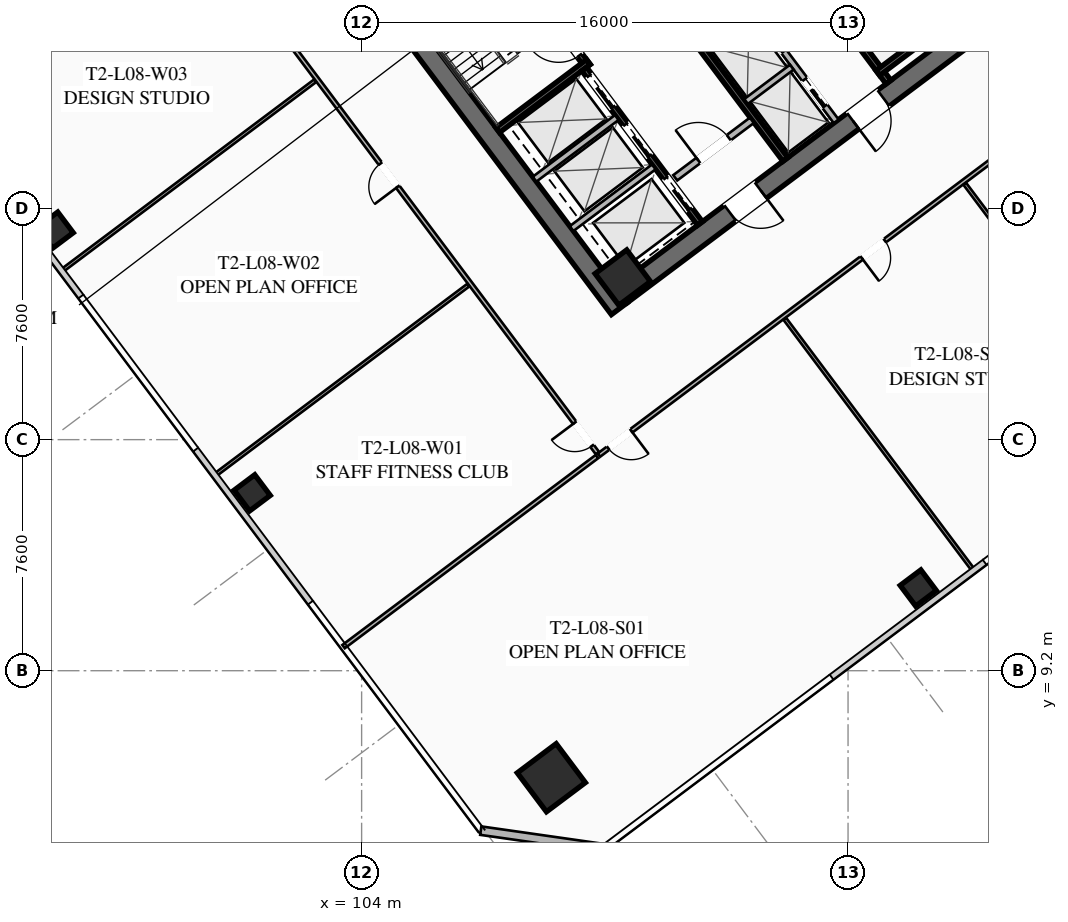
"""IFC4 building model, lengths in metres.
Left out: names, types, materials, properties, quantities, classifications, styles, units other than length and angle.
Written with IfcOpenShell. Run it as: python <this file> out.ifc"""

import sys

from ifc_helpers import new_model, si_unit, direction, frame, frame_2d, origin, origin_2d, place, context, subcontext, project, spatial, rectangle, hollow_rectangle, extrude, element, fill, save


model = new_model("IFC4")
c1 = context("Model", 3, precision=1e-05, world=origin(), true_north=direction((0.0, 1.0)))
c2 = subcontext(c1, "Body", "Model", "MODEL_VIEW")
j1 = project(units=[si_unit("LENGTHUNIT", "METRE"), si_unit("PLANEANGLEUNIT", "RADIAN")], contexts=[c1])
p1 = place(None, origin())
s1 = spatial("IfcSite", under=j1, at=p1, CompositionType="ELEMENT")
p2 = place(p1, origin())
s2 = spatial("IfcBuilding", under=s1, at=p2, CompositionType="ELEMENT")
p3 = place(p2, frame((0.0, 0.0, 35.25)))
s3 = spatial("IfcBuildingStorey", under=s2, at=p3, CompositionType="ELEMENT", Elevation=35.25)
p4 = place(p3, frame((112.476, 21.107, 0.0), z_axis=(0.0, 0.0, 1.0), x_axis=(-0.600005007985, 0.799996243986, 0.0)))
e1 = element("IfcWall", 1, at=p4, inside=s3, PredefinedType="SHEAR", context=c2, shape_type="SweptSolid", body=[
    extrude(rectangle(XDim=15.6, YDim=0.65, at=frame_2d((7.8, 0.0))), origin(), (0.0, 0.0, 1.0), 3.55),
])
p5 = place(p3, frame((124.429, 30.478, 0.0), z_axis=(0.0, 0.0, 1.0), x_axis=(-0.799998028465, -0.600002628705, 0.0)))
e2 = element("IfcWall", 2, at=p5, inside=s3, PredefinedType="SHEAR", context=c2, shape_type="SweptSolid", body=[
    extrude(rectangle(XDim=14.86, YDim=0.65, at=frame_2d((7.43, 0.0))), origin(), (0.0, 0.0, 1.0), 3.55),
])
p6 = place(p5, frame((9.13, 0.0, 0.0)))
e3 = element("IfcOpeningElement", 3, at=p6, cuts=e2, PredefinedType="OPENING", context=c2, shape_type="SweptSolid", body=[
    extrude(rectangle(XDim=1.25, YDim=2.25, at=frame_2d((0.625, 1.125))), frame((0.0, 0.335, 0.0), z_axis=(0.0, -1.0, 0.0), x_axis=(1.0, 0.0, 0.0)), (0.0, 0.0, 1.0), 0.67),
])
p7 = place(p5, frame((4.08, 0.0, 0.0)))
e4 = element("IfcOpeningElement", 4, at=p7, cuts=e2, PredefinedType="OPENING", context=c2, shape_type="SweptSolid", body=[
    extrude(rectangle(XDim=1.25, YDim=2.25, at=frame_2d((0.625, 1.125))), frame((0.0, 0.335, 0.0), z_axis=(0.0, -1.0, 0.0), x_axis=(1.0, 0.0, 0.0)), (0.0, 0.0, 1.0), 0.67),
])
p8 = place(p3, frame((112.59, 22.13, 0.0), z_axis=(0.0, 0.0, 1.0), x_axis=(0.799999996291, 0.600000004945, 0.0)))
e5 = element("IfcColumn", 5, at=p8, inside=s3, PredefinedType="COLUMN", context=c2, shape_type="SweptSolid", body=[
    extrude(hollow_rectangle(XDim=1.3, YDim=1.3, WallThickness=0.05, at=origin_2d()), origin(), (0.0, 0.0, 1.0), 3.35),
])
p9 = place(p3, frame((110.24, 5.68, 0.0), z_axis=(0.0, 0.0, 1.0), x_axis=(0.799999996291, 0.600000004945, 0.0)))
e6 = element("IfcColumn", 6, at=p9, inside=s3, PredefinedType="COLUMN", context=c2, shape_type="SweptSolid", body=[
    extrude(hollow_rectangle(XDim=1.6, YDim=1.6, WallThickness=0.06, at=origin_2d()), origin(), (0.0, 0.0, 1.0), 3.35),
])
for number, where, z_axis, x_axis in (
    (7, (122.31, 11.92, 0.0), (0.0, 0.0, 1.0), (0.8, 0.6, 0.0)),
    (8, (93.92, 23.69, 0.0), (0.0, 0.0, 1.0), (0.8, 0.6, 0.0)),
    (9, (100.4, 15.05, 0.0), (0.0, 0.0, 1.0), (0.8, 0.6, 0.0)),
):
    element("IfcColumn", number, at=place(p3, frame(where, z_axis=z_axis, x_axis=x_axis)), inside=s3, PredefinedType="COLUMN", context=c2, shape_type="SweptSolid", body=[
        extrude(hollow_rectangle(XDim=0.85, YDim=0.85, WallThickness=0.035, at=origin_2d()), origin(), (0.0, 0.0, 1.0), 3.35),
    ])
p10 = place(p3, frame((111.98, 3.36, 0.0), z_axis=(0.0, 0.0, 1.0), x_axis=(-0.989955445613, 0.14137968631, 0.0)))
e10 = element("IfcWall", 10, at=p10, inside=s3, PredefinedType="SOLIDWALL", context=c2, shape_type="SweptSolid", body=[
    extrude(rectangle(XDim=4.101, YDim=0.28, at=frame_2d((2.051, 0.0))), origin(), (0.0, 0.0, 1.0), 3.35),
])
p11 = place(p3, frame((111.44, 29.08, 0.0), z_axis=(0.0, 0.0, 1.0), x_axis=(-0.600009827119, 0.799992629566, 0.0)))
e11 = element("IfcWall", 11, at=p11, inside=s3, PredefinedType="SHEAR", context=c2, shape_type="SweptSolid", body=[
    extrude(rectangle(XDim=7.95, YDim=0.2, at=frame_2d((3.975, 0.0))), origin(), (0.0, 0.0, 1.0), 3.35),
])
p12 = place(p11, frame((0.45, 0.0, 0.0)))
e12 = element("IfcOpeningElement", 12, at=p12, cuts=e11, PredefinedType="OPENING", context=c2, shape_type="SweptSolid", body=[
    extrude(rectangle(XDim=1.15, YDim=2.2, at=frame_2d((0.575, 1.1))), frame((0.0, 0.11, 0.0), z_axis=(0.0, -1.0, 0.0), x_axis=(1.0, 0.0, 0.0)), (0.0, 0.0, 1.0), 0.22),
])
p13 = place(p3, frame((108.476, 26.982, 0.0), z_axis=(0.0, 0.0, 1.0), x_axis=(0.799984290658, 0.600020945218, 0.0)))
e13 = element("IfcWall", 13, at=p13, inside=s3, PredefinedType="SHEAR", context=c2, shape_type="SweptSolid", body=[
    extrude(rectangle(XDim=3.73, YDim=0.2, at=frame_2d((1.865, 0.0))), origin(), (0.0, 0.0, 1.0), 3.35),
])
p14 = place(p3, frame((116.56, 34.92, 0.0), z_axis=(0.0, 0.0, 1.0), x_axis=(0.600009827119, -0.799992629566, 0.0)))
e14 = element("IfcWall", 14, at=p14, inside=s3, PredefinedType="SHEAR", context=c2, shape_type="SweptSolid", body=[
    extrude(rectangle(XDim=7.95, YDim=0.2, at=frame_2d((3.975, 0.0))), origin(), (0.0, 0.0, 1.0), 3.35),
])
p15 = place(p14, frame((0.45, 0.0, 0.0)))
e15 = element("IfcOpeningElement", 15, at=p15, cuts=e14, PredefinedType="OPENING", context=c2, shape_type="SweptSolid", body=[
    extrude(rectangle(XDim=1.15, YDim=2.2, at=frame_2d((0.575, 1.1))), frame((0.0, 0.11, 0.0), z_axis=(0.0, -1.0, 0.0), x_axis=(1.0, 0.0, 0.0)), (0.0, 0.0, 1.0), 0.22),
])
p16 = place(p3, frame((120.98, 28.86, 0.0), z_axis=(0.0, 0.0, 1.0), x_axis=(0.800039270442, 0.59994763584, 0.0)))
e16 = element("IfcWall", 16, at=p16, inside=s3, PredefinedType="SHEAR", context=c2, shape_type="SweptSolid", body=[
    extrude(rectangle(XDim=3.73, YDim=0.2, at=frame_2d((1.865, 0.0))), origin(), (0.0, 0.0, 1.0), 3.35),
])
p17 = place(p3, frame((117.938, 26.016, 0.0), z_axis=(0.0, 0.0, 1.0), x_axis=(-0.600005463273, 0.799995902516, 0.0)))
e17 = element("IfcWall", 17, at=p17, inside=s3, PredefinedType="SHEAR", context=c2, shape_type="SweptSolid", body=[
    extrude(rectangle(XDim=14.3, YDim=0.2, at=frame_2d((7.15, 0.0))), origin(), (0.0, 0.0, 1.0), 3.35),
])
p18 = place(p3, frame((114.316, 25.412, 0.0), z_axis=(0.0, 0.0, 1.0), x_axis=(0.800018601094, 0.59997519774, 0.0)))
e18 = element("IfcWall", 18, at=p18, inside=s3, PredefinedType="SOLIDWALL", context=c2, shape_type="SweptSolid", body=[
    extrude(rectangle(XDim=3.15, YDim=0.22, at=frame_2d((1.575, 0.0))), origin(), (0.0, 0.0, 1.0), 2.703),
])
p19 = place(p18, frame((0.95, 0.0, 0.0)))
e19 = element("IfcOpeningElement", 19, at=p19, cuts=e18, PredefinedType="OPENING", context=c2, shape_type="SweptSolid", body=[
    extrude(rectangle(XDim=1.25, YDim=2.25, at=frame_2d((0.625, 1.125))), frame((0.0, 0.12, 0.0), z_axis=(0.0, -1.0, 0.0), x_axis=(1.0, 0.0, 0.0)), (0.0, 0.0, 1.0), 0.24),
])
p20 = place(p3, frame((115.13, 23.91, 0.0), z_axis=(0.0, 0.0, 1.0), x_axis=(-0.599975393228, 0.800018454488, 0.0)))
e20 = element("IfcWall", 20, at=p20, inside=s3, PredefinedType="SHEAR", context=c2, shape_type="SweptSolid", body=[
    extrude(rectangle(XDim=6.35, YDim=0.2, at=frame_2d((3.175, 0.0))), origin(), (0.0, 0.0, 1.0), 3.35),
])
p21 = place(p20, frame((4.775, 0.0, 0.0)))
e21 = element("IfcOpeningElement", 21, at=p21, cuts=e20, PredefinedType="OPENING", context=c2, shape_type="SweptSolid", body=[
    extrude(rectangle(XDim=1.3, YDim=2.25, at=frame_2d((0.65, 1.125))), frame((0.0, 0.11, 0.0), z_axis=(0.0, -1.0, 0.0), x_axis=(1.0, 0.0, 0.0)), (0.0, 0.0, 1.0), 0.22),
])
p22 = place(p20, frame((2.775, 0.0, 0.0)))
e22 = element("IfcOpeningElement", 22, at=p22, cuts=e20, PredefinedType="OPENING", context=c2, shape_type="SweptSolid", body=[
    extrude(rectangle(XDim=1.3, YDim=2.25, at=frame_2d((0.65, 1.125))), frame((0.0, 0.11, 0.0), z_axis=(0.0, -1.0, 0.0), x_axis=(1.0, 0.0, 0.0)), (0.0, 0.0, 1.0), 0.22),
])
p23 = place(p20, frame((0.575, 0.0, 0.0)))
e23 = element("IfcOpeningElement", 23, at=p23, cuts=e20, PredefinedType="OPENING", context=c2, shape_type="SweptSolid", body=[
    extrude(rectangle(XDim=1.3, YDim=2.25, at=frame_2d((0.65, 1.125))), frame((0.0, 0.11, 0.0), z_axis=(0.0, -1.0, 0.0), x_axis=(1.0, 0.0, 0.0)), (0.0, 0.0, 1.0), 0.22),
])
for number, where, z_axis, x_axis in (
    (24, (110.906, 23.742, 0.0), (0.0, 0.0, 1.0), (0.8, 0.6, 0.0)),
    (25, (109.688, 25.366, 0.0), (0.0, 0.0, 1.0), (0.8, 0.6, 0.0)),
):
    element("IfcWall", number, at=place(p3, frame(where, z_axis=z_axis, x_axis=x_axis)), inside=s3, PredefinedType="SOLIDWALL", context=c2, shape_type="SweptSolid", body=[
        extrude(rectangle(XDim=3.38, YDim=0.2, at=frame_2d((1.69, 0.0))), origin(), (0.0, 0.0, 1.0), 3.35),
    ])
p24 = place(p3, frame((119.61, 27.27, 0.0), z_axis=(0.0, 0.0, 1.0), x_axis=(-0.600011488909, 0.79999138319, 0.0)))
e26 = element("IfcWall", 26, at=p24, inside=s3, PredefinedType="SOLIDWALL", context=c2, shape_type="SweptSolid", body=[
    extrude(rectangle(XDim=6.8, YDim=0.2, at=frame_2d((3.4, 0.0))), origin(), (0.0, 0.0, 1.0), 3.35),
])
p25 = place(p24, frame((0.625, 0.0, 0.0)))
e27 = element("IfcOpeningElement", 27, at=p25, cuts=e26, PredefinedType="OPENING", context=c2, shape_type="SweptSolid", body=[
    extrude(rectangle(XDim=1.1, YDim=2.2, at=frame_2d((0.55, 1.1))), frame((0.0, 0.11, 0.0), z_axis=(0.0, -1.0, 0.0), x_axis=(1.0, 0.0, 0.0)), (0.0, 0.0, 1.0), 0.22),
])
p26 = place(p24, frame((2.875, 0.0, 0.0)))
e28 = element("IfcOpeningElement", 28, at=p26, cuts=e26, PredefinedType="OPENING", context=c2, shape_type="SweptSolid", body=[
    extrude(rectangle(XDim=1.1, YDim=2.2, at=frame_2d((0.55, 1.1))), frame((0.0, 0.11, 0.0), z_axis=(0.0, -1.0, 0.0), x_axis=(1.0, 0.0, 0.0)), (0.0, 0.0, 1.0), 0.22),
])
p27 = place(p24, frame((5.125, 0.0, 0.0)))
e29 = element("IfcOpeningElement", 29, at=p27, cuts=e26, PredefinedType="OPENING", context=c2, shape_type="SweptSolid", body=[
    extrude(rectangle(XDim=1.1, YDim=2.2, at=frame_2d((0.55, 1.1))), frame((0.0, 0.11, 0.0), z_axis=(0.0, -1.0, 0.0), x_axis=(1.0, 0.0, 0.0)), (0.0, 0.0, 1.0), 0.22),
])
p28 = place(p3, frame((116.646, 27.922, 0.0), z_axis=(0.0, 0.0, 1.0), x_axis=(0.8, 0.6, 0.0)))
e30 = element("IfcWall", 30, at=p28, inside=s3, PredefinedType="SOLIDWALL", context=c2, shape_type="SweptSolid", body=[
    extrude(rectangle(XDim=1.88, YDim=0.2, at=frame_2d((0.94, 0.0))), origin(), (0.0, 0.0, 1.0), 3.35),
])
p29 = place(p3, frame((135.67, 34.19, 0.0), z_axis=(0.0, 0.0, 1.0), x_axis=(-0.800000982127, -0.599998690494, 0.0)))
e31 = element("IfcWall", 31, at=p29, inside=s3, PredefinedType="PARTITIONING", context=c2, shape_type="SweptSolid", body=[
    extrude(rectangle(XDim=29.83, YDim=0.135, at=frame_2d((14.915, 0.0))), origin(), (0.0, 0.0, 1.0), 2.703),
])
p30 = place(p29, frame((28.5, 0.0, 0.0)))
e32 = element("IfcOpeningElement", 32, at=p30, cuts=e31, PredefinedType="OPENING", context=c2, shape_type="SweptSolid", body=[
    extrude(rectangle(XDim=0.95, YDim=2.05, at=frame_2d((0.475, 1.025))), frame((0.0, 0.077, 0.0), z_axis=(0.0, -1.0, 0.0), x_axis=(1.0, 0.0, 0.0)), (0.0, 0.0, 1.0), 0.155),
])
p31 = place(p29, frame((18.075, 0.0, 0.0)))
e33 = element("IfcOpeningElement", 33, at=p31, cuts=e31, PredefinedType="OPENING", context=c2, shape_type="SweptSolid", body=[
    extrude(rectangle(XDim=0.95, YDim=2.05, at=frame_2d((0.475, 1.025))), frame((0.0, 0.077, 0.0), z_axis=(0.0, -1.0, 0.0), x_axis=(1.0, 0.0, 0.0)), (0.0, 0.0, 1.0), 0.155),
])
p32 = place(p29, frame((0.38, 0.0, 0.0)))
e34 = element("IfcOpeningElement", 34, at=p32, cuts=e31, PredefinedType="OPENING", context=c2, shape_type="SweptSolid", body=[
    extrude(rectangle(XDim=0.95, YDim=2.05, at=frame_2d((0.475, 1.025))), frame((0.0, 0.077, 0.0), z_axis=(0.0, -1.0, 0.0), x_axis=(1.0, 0.0, 0.0)), (0.0, 0.0, 1.0), 0.155),
])
p33 = place(p3, frame((124.128, 12.496, 0.0), z_axis=(0.0, 0.0, 1.0), x_axis=(-0.600007548425, 0.799994338626, 0.0)))
e35 = element("IfcWall", 35, at=p33, inside=s3, PredefinedType="PARTITIONING", context=c2, shape_type="SweptSolid", body=[
    extrude(rectangle(XDim=10.35, YDim=0.11, at=frame_2d((5.175, 0.0))), origin(), (0.0, 0.0, 1.0), 2.703),
])
p34 = place(p3, frame((130.048, 16.936, 0.0), z_axis=(0.0, 0.0, 1.0), x_axis=(-0.600011322243, 0.799991508192, 0.0)))
e36 = element("IfcWall", 36, at=p34, inside=s3, PredefinedType="PARTITIONING", context=c2, shape_type="SweptSolid", body=[
    extrude(rectangle(XDim=10.35, YDim=0.11, at=frame_2d((5.175, 0.0))), origin(), (0.0, 0.0, 1.0), 2.703),
])
p35 = place(p3, frame((111.758, 16.356, 0.0), z_axis=(0.0, 0.0, 1.0), x_axis=(-0.600001776367, 0.799998667722, 0.0)))
e37 = element("IfcWall", 37, at=p35, inside=s3, PredefinedType="PARTITIONING", context=c2, shape_type="SweptSolid", body=[
    extrude(rectangle(XDim=21.99, YDim=0.135, at=frame_2d((10.995, 0.0))), origin(), (0.0, 0.0, 1.0), 2.703),
])
p36 = place(p35, frame((0.3, 0.0, 0.0)))
e38 = element("IfcOpeningElement", 38, at=p36, cuts=e37, PredefinedType="OPENING", context=c2, shape_type="SweptSolid", body=[
    extrude(rectangle(XDim=0.95, YDim=2.05, at=frame_2d((0.475, 1.025))), frame((0.0, 0.077, 0.0), z_axis=(0.0, -1.0, 0.0), x_axis=(1.0, 0.0, 0.0)), (0.0, 0.0, 1.0), 0.155),
])
p37 = place(p35, frame((10.952, 0.0, 0.0)))
e39 = element("IfcOpeningElement", 39, at=p37, cuts=e37, PredefinedType="OPENING", context=c2, shape_type="SweptSolid", body=[
    extrude(rectangle(XDim=0.95, YDim=2.05, at=frame_2d((0.475, 1.025))), frame((0.0, 0.077, 0.0), z_axis=(0.0, -1.0, 0.0), x_axis=(1.0, 0.0, 0.0)), (0.0, 0.0, 1.0), 0.155),
])
p38 = place(p35, frame((20.74, 0.0, 0.0)))
e40 = element("IfcOpeningElement", 40, at=p38, cuts=e37, PredefinedType="OPENING", context=c2, shape_type="SweptSolid", body=[
    extrude(rectangle(XDim=0.95, YDim=2.05, at=frame_2d((0.475, 1.025))), frame((0.0, 0.077, 0.0), z_axis=(0.0, -1.0, 0.0), x_axis=(1.0, 0.0, 0.0)), (0.0, 0.0, 1.0), 0.155),
])
p39 = place(p3, frame((98.452, 33.964, 0.0), z_axis=(0.0, 0.0, 1.0), x_axis=(-0.799988753532, -0.600014994998, 0.0)))
e41 = element("IfcWall", 41, at=p39, inside=s3, PredefinedType="PARTITIONING", context=c2, shape_type="SweptSolid", body=[
    extrude(rectangle(XDim=10.42, YDim=0.135, at=frame_2d((5.21, 0.0))), origin(), (0.0, 0.0, 1.0), 2.703),
])
p40 = place(p3, frame((103.406, 9.992, 0.0), z_axis=(0.0, 0.0, 1.0), x_axis=(0.8, 0.6, 0.0)))
e42 = element("IfcWall", 42, at=p40, inside=s3, PredefinedType="PARTITIONING", context=c2, shape_type="SweptSolid", body=[
    extrude(rectangle(XDim=10.42, YDim=0.135, at=frame_2d((5.21, 0.0))), origin(), (0.0, 0.0, 1.0), 2.703),
])
for number, where, z_axis, x_axis in (
    (43, (99.176, 15.632, 0.0), (0.0, 0.0, 1.0), (0.8, 0.6, 0.0)),
    (44, (94.136, 22.352, 0.0), (0.0, 0.0, 1.0), (0.8, 0.6, 0.0)),
):
    element("IfcWall", number, at=place(p3, frame(where, z_axis=z_axis, x_axis=x_axis)), inside=s3, PredefinedType="PARTITIONING", context=c2, shape_type="SweptSolid", body=[
        extrude(rectangle(XDim=10.42, YDim=0.11, at=frame_2d((5.21, 0.0))), origin(), (0.0, 0.0, 1.0), 2.703),
    ])
p41 = place(p6, origin())
e45 = element("IfcDoor", 45, at=p41, inside=s3, OperationType="SINGLE_SWING_LEFT", PredefinedType="DOOR", context=c2, shape_type="SweptSolid", body=[
    extrude(rectangle(XDim=1.25, YDim=2.25, at=frame_2d((0.625, 1.125))), frame((0.0, 0.025, 0.0), z_axis=(0.0, -1.0, 0.0), x_axis=(1.0, 0.0, 0.0)), (0.0, 0.0, 1.0), 0.05),
])
fill(e3, e45)
p42 = place(p7, origin())
e46 = element("IfcDoor", 46, at=p42, inside=s3, OperationType="SINGLE_SWING_RIGHT", PredefinedType="DOOR", context=c2, shape_type="SweptSolid", body=[
    extrude(rectangle(XDim=1.25, YDim=2.25, at=frame_2d((0.625, 1.125))), frame((0.0, 0.025, 0.0), z_axis=(0.0, -1.0, 0.0), x_axis=(1.0, 0.0, 0.0)), (0.0, 0.0, 1.0), 0.05),
])
fill(e4, e46)
p43 = place(p12, origin())
e47 = element("IfcDoor", 47, at=p43, inside=s3, OperationType="SINGLE_SWING_RIGHT", PredefinedType="DOOR", context=c2, shape_type="SweptSolid", body=[
    extrude(rectangle(XDim=1.15, YDim=2.2, at=frame_2d((0.575, 1.1))), frame((0.0, 0.025, 0.0), z_axis=(0.0, -1.0, 0.0), x_axis=(1.0, 0.0, 0.0)), (0.0, 0.0, 1.0), 0.05),
])
fill(e12, e47)
p44 = place(p19, origin())
e48 = element("IfcDoor", 48, at=p44, inside=s3, OperationType="SINGLE_SWING_LEFT", PredefinedType="DOOR", context=c2, shape_type="SweptSolid", body=[
    extrude(rectangle(XDim=1.25, YDim=2.25, at=frame_2d((0.625, 1.125))), frame((0.0, 0.025, 0.0), z_axis=(0.0, -1.0, 0.0), x_axis=(1.0, 0.0, 0.0)), (0.0, 0.0, 1.0), 0.05),
])
fill(e19, e48)
p45 = place(p30, origin())
e49 = element("IfcDoor", 49, at=p45, inside=s3, OperationType="SINGLE_SWING_LEFT", PredefinedType="DOOR", context=c2, shape_type="SweptSolid", body=[
    extrude(rectangle(XDim=0.95, YDim=2.05, at=frame_2d((0.475, 1.025))), frame((0.0, 0.025, 0.0), z_axis=(0.0, -1.0, 0.0), x_axis=(1.0, 0.0, 0.0)), (0.0, 0.0, 1.0), 0.05),
])
fill(e32, e49)
p46 = place(p31, origin())
e50 = element("IfcDoor", 50, at=p46, inside=s3, OperationType="SINGLE_SWING_RIGHT", PredefinedType="DOOR", context=c2, shape_type="SweptSolid", body=[
    extrude(rectangle(XDim=0.95, YDim=2.05, at=frame_2d((0.475, 1.025))), frame((0.0, 0.025, 0.0), z_axis=(0.0, -1.0, 0.0), x_axis=(1.0, 0.0, 0.0)), (0.0, 0.0, 1.0), 0.05),
])
fill(e33, e50)
p47 = place(p36, origin())
e51 = element("IfcDoor", 51, at=p47, inside=s3, OperationType="SINGLE_SWING_RIGHT", PredefinedType="DOOR", context=c2, shape_type="SweptSolid", body=[
    extrude(rectangle(XDim=0.95, YDim=2.05, at=frame_2d((0.475, 1.025))), frame((0.0, 0.025, 0.0), z_axis=(0.0, -1.0, 0.0), x_axis=(1.0, 0.0, 0.0)), (0.0, 0.0, 1.0), 0.05),
])
fill(e38, e51)
p48 = place(p37, origin())
e52 = element("IfcDoor", 52, at=p48, inside=s3, OperationType="SINGLE_SWING_LEFT", PredefinedType="DOOR", context=c2, shape_type="SweptSolid", body=[
    extrude(rectangle(XDim=0.95, YDim=2.05, at=frame_2d((0.475, 1.025))), frame((0.0, 0.025, 0.0), z_axis=(0.0, -1.0, 0.0), x_axis=(1.0, 0.0, 0.0)), (0.0, 0.0, 1.0), 0.05),
])
fill(e39, e52)
p49 = place(p21, origin())
e53 = element("IfcDoor", 53, at=p49, inside=s3, OperationType="SLIDING_TO_LEFT", PredefinedType="DOOR", context=c2, shape_type="SweptSolid", body=[
    extrude(rectangle(XDim=1.3, YDim=2.25, at=frame_2d((0.65, 1.125))), frame((0.0, 0.025, 0.0), z_axis=(0.0, -1.0, 0.0), x_axis=(1.0, 0.0, 0.0)), (0.0, 0.0, 1.0), 0.05),
])
fill(e21, e53)
p50 = place(p22, origin())
e54 = element("IfcDoor", 54, at=p50, inside=s3, OperationType="SLIDING_TO_LEFT", PredefinedType="DOOR", context=c2, shape_type="SweptSolid", body=[
    extrude(rectangle(XDim=1.3, YDim=2.25, at=frame_2d((0.65, 1.125))), frame((0.0, 0.025, 0.0), z_axis=(0.0, -1.0, 0.0), x_axis=(1.0, 0.0, 0.0)), (0.0, 0.0, 1.0), 0.05),
])
fill(e22, e54)
p51 = place(p23, origin())
e55 = element("IfcDoor", 55, at=p51, inside=s3, OperationType="SLIDING_TO_LEFT", PredefinedType="DOOR", context=c2, shape_type="SweptSolid", body=[
    extrude(rectangle(XDim=1.3, YDim=2.25, at=frame_2d((0.65, 1.125))), frame((0.0, 0.025, 0.0), z_axis=(0.0, -1.0, 0.0), x_axis=(1.0, 0.0, 0.0)), (0.0, 0.0, 1.0), 0.05),
])
fill(e23, e55)
p52 = place(p25, origin())
e56 = element("IfcDoor", 56, at=p52, inside=s3, OperationType="SLIDING_TO_LEFT", PredefinedType="DOOR", context=c2, shape_type="SweptSolid", body=[
    extrude(rectangle(XDim=1.1, YDim=2.2, at=frame_2d((0.55, 1.1))), frame((0.0, 0.025, 0.0), z_axis=(0.0, -1.0, 0.0), x_axis=(1.0, 0.0, 0.0)), (0.0, 0.0, 1.0), 0.05),
])
fill(e27, e56)
save(model, sys.argv[1])
